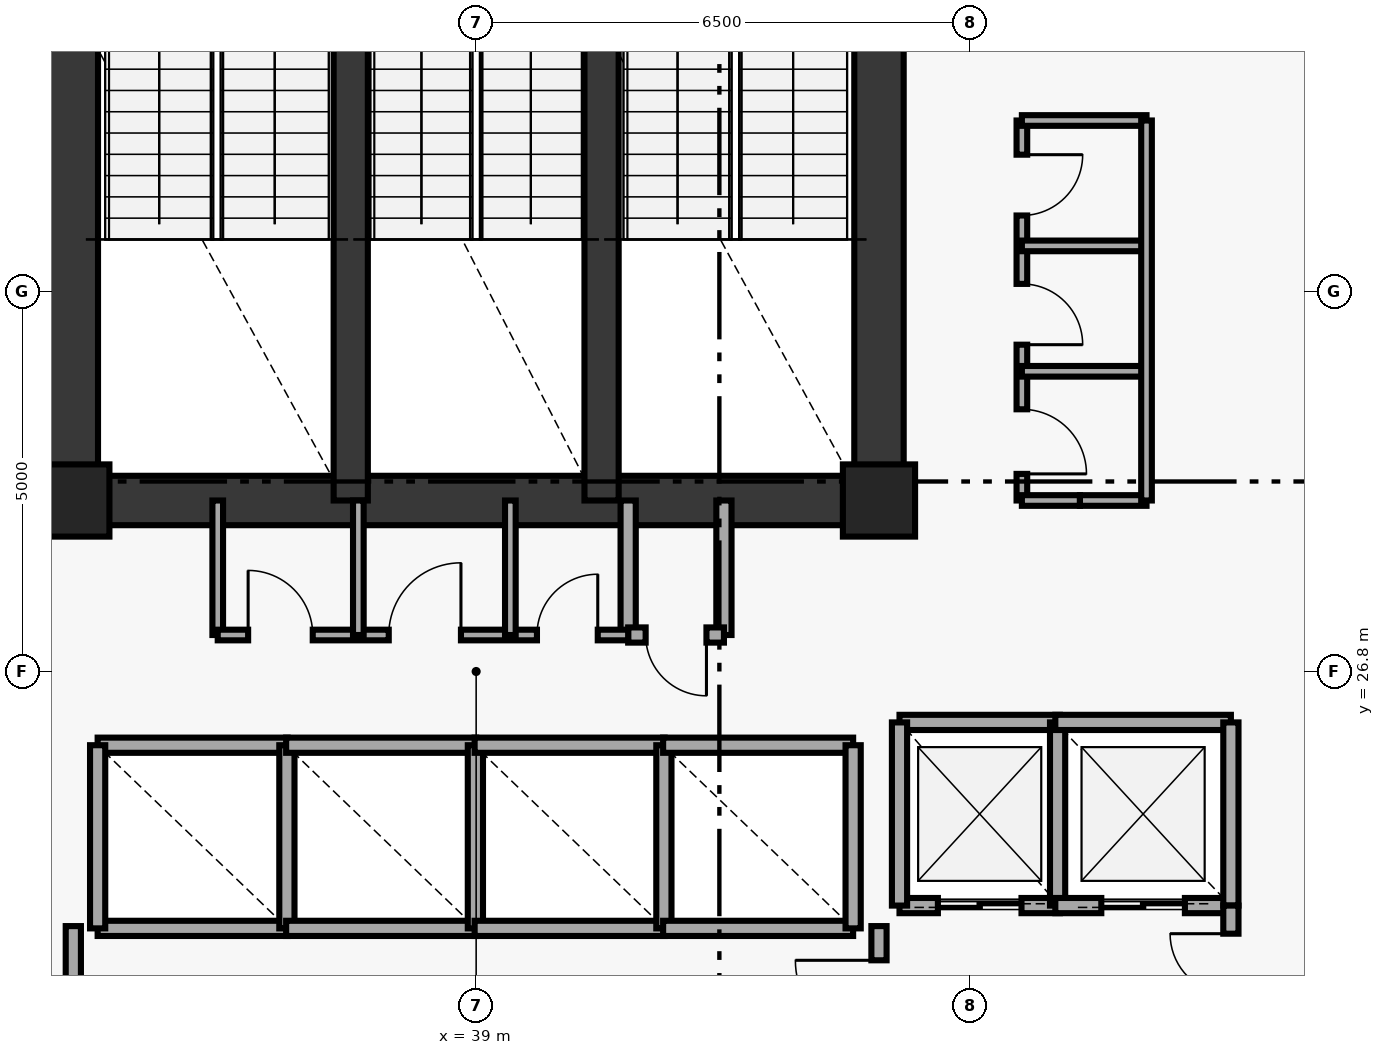
"""IFC4 building model, lengths in metres.
Left out: names, types, materials, properties, quantities, classifications, styles, units other than length and angle.
Written with IfcOpenShell. Run it as: python <this file> out.ifc"""

import sys

from ifc_helpers import new_model, si_unit, direction, frame, frame_2d, origin, origin_2d, place, context, subcontext, project, spatial, rectangle, extrude, element, fill, save


model = new_model("IFC4")
c1 = context("Model", 3, precision=1e-05, world=origin(), true_north=direction((0.0, 1.0)))
c2 = subcontext(c1, "Body", "Model", "MODEL_VIEW")
j1 = project(units=[si_unit("LENGTHUNIT", "METRE"), si_unit("PLANEANGLEUNIT", "RADIAN")], contexts=[c1])
p1 = place(None, origin())
s1 = spatial("IfcSite", under=j1, at=p1, CompositionType="ELEMENT")
p2 = place(p1, origin())
s2 = spatial("IfcBuilding", under=s1, at=p2, CompositionType="ELEMENT")
p3 = place(p2, frame((0.0, 0.0, 195.95)))
s3 = spatial("IfcBuildingStorey", under=s2, at=p3, CompositionType="ELEMENT", Elevation=195.95)
for number, where, z_axis, x_axis in (
    (1, (44.3, 29.05, 0.0), (0.0, 0.0, 1.0), (1.0, 0.0, 0.0)),
    (2, (33.7, 29.05, 0.0), (0.0, 0.0, 1.0), (1.0, 0.0, 0.0)),
):
    element("IfcColumn", number, at=place(p3, frame(where, z_axis=z_axis, x_axis=x_axis)), inside=s3, PredefinedType="PILASTER", context=c2, shape_type="SweptSolid", body=[
        extrude(rectangle(XDim=0.95, YDim=0.95, at=origin_2d()), origin(), (0.0, 0.0, 1.0), 6.88),
    ])
for number, where, z_axis, x_axis in (
    (3, (33.7, 29.05, 0.0), (0.0, 0.0, 1.0), (0.0, 1.0, 0.0)),
    (4, (44.3, 29.05, 0.0), (0.0, 0.0, 1.0), (0.0, 1.0, 0.0)),
):
    element("IfcWall", number, at=place(p3, frame(where, z_axis=z_axis, x_axis=x_axis)), inside=s3, PredefinedType="SHEAR", context=c2, shape_type="SweptSolid", body=[
        extrude(rectangle(XDim=8.35, YDim=0.65, at=frame_2d((4.175, 0.0))), origin(), (0.0, 0.0, 1.0), 6.88),
    ])
p4 = place(p3, frame((33.7, 29.05, 0.0), z_axis=(0.0, 0.0, 1.0), x_axis=(1.0, 0.0, 0.0)))
e5 = element("IfcWall", 5, at=p4, inside=s3, PredefinedType="SHEAR", context=c2, shape_type="SweptSolid", body=[
    extrude(rectangle(XDim=10.6, YDim=0.65, at=frame_2d((5.3, 0.0))), origin(), (0.0, 0.0, 1.0), 6.88),
])
for number, where, z_axis, x_axis in (
    (6, (37.35, 29.05, 0.0), (0.0, 0.0, 1.0), (0.0, 1.0, 0.0)),
    (7, (40.65, 29.05, 0.0), (0.0, 0.0, 1.0), (0.0, 1.0, 0.0)),
):
    element("IfcWall", number, at=place(p3, frame(where, z_axis=z_axis, x_axis=x_axis)), inside=s3, PredefinedType="SHEAR", context=c2, shape_type="SweptSolid", body=[
        extrude(rectangle(XDim=8.35, YDim=0.45, at=frame_2d((4.175, 0.0))), origin(), (0.0, 0.0, 1.0), 6.88),
    ])
p5 = place(p3, frame((35.6, 27.28, 0.0), z_axis=(0.0, 0.0, 1.0), x_axis=(0.0, 1.0, 0.0)))
e8 = element("IfcWall", 8, at=p5, inside=s3, PredefinedType="PARTITIONING", context=c2, shape_type="SweptSolid", body=[
    extrude(rectangle(XDim=1.77, YDim=0.14, at=frame_2d((0.885, 0.0))), origin(), (0.0, 0.0, 1.0), 6.88),
])
for number, where, z_axis, x_axis in (
    (9, (41.0, 27.28, 0.0), (0.0, 0.0, 1.0), (0.0, 1.0, 0.0)),
    (10, (42.26, 27.28, 0.0), (0.0, 0.0, 1.0), (0.0, 1.0, 0.0)),
):
    element("IfcWall", number, at=place(p3, frame(where, z_axis=z_axis, x_axis=x_axis)), inside=s3, PredefinedType="SOLIDWALL", context=c2, shape_type="SweptSolid", body=[
        extrude(rectangle(XDim=1.77, YDim=0.2, at=frame_2d((0.885, 0.0))), origin(), (0.0, 0.0, 1.0), 6.88),
    ])
p6 = place(p3, frame((41.0, 27.28, 0.0), z_axis=(0.0, 0.0, 1.0), x_axis=(1.0, 0.0, 0.0)))
e11 = element("IfcWall", 11, at=p6, inside=s3, PredefinedType="SOLIDWALL", context=c2, shape_type="SweptSolid", body=[
    extrude(rectangle(XDim=1.26, YDim=0.2, at=frame_2d((0.63, 0.0))), origin(), (0.0, 0.0, 1.0), 6.88),
])
p7 = place(p6, frame((0.23, 0.0, 0.0)))
e12 = element("IfcOpeningElement", 12, at=p7, cuts=e11, PredefinedType="OPENING", context=c2, shape_type="SweptSolid", body=[
    extrude(rectangle(XDim=0.8, YDim=2.05, at=frame_2d((0.4, 1.025))), frame((0.0, 0.11, 0.0), z_axis=(0.0, -1.0, 0.0), x_axis=(1.0, 0.0, 0.0)), (0.0, 0.0, 1.0), 0.22),
])
p8 = place(p3, frame((44.57, 23.72, 0.0), z_axis=(0.0, 0.0, 1.0), x_axis=(1.0, 0.0, 0.0)))
e13 = element("IfcWall", 13, at=p8, inside=s3, PredefinedType="SOLIDWALL", context=c2, shape_type="SweptSolid", body=[
    extrude(rectangle(XDim=2.11, YDim=0.2, at=frame_2d((1.055, 0.0))), origin(), (0.0, 0.0, 1.0), 6.88),
])
p9 = place(p8, frame((0.505, 0.0, 0.0)))
e14 = element("IfcOpeningElement", 14, at=p9, cuts=e13, PredefinedType="OPENING", context=c2, shape_type="SweptSolid", body=[
    extrude(rectangle(XDim=1.1, YDim=2.15, at=frame_2d((0.55, 1.075))), frame((0.0, 0.11, 0.0), z_axis=(0.0, -1.0, 0.0), x_axis=(1.0, 0.0, 0.0)), (0.0, 0.0, 1.0), 0.22),
])
p10 = place(p3, frame((44.57, 26.13, 0.0), z_axis=(0.0, 0.0, 1.0), x_axis=(1.0, 0.0, 0.0)))
e15 = element("IfcWall", 15, at=p10, inside=s3, PredefinedType="SOLIDWALL", context=c2, shape_type="SweptSolid", body=[
    extrude(rectangle(XDim=2.11, YDim=0.2, at=frame_2d((1.055, 0.0))), origin(), (0.0, 0.0, 1.0), 6.88),
])
for number, where, z_axis, x_axis in (
    (16, (44.57, 23.72, 0.0), (0.0, 0.0, 1.0), (0.0, 1.0, 0.0)),
    (17, (46.65, 23.72, 0.0), (0.0, 0.0, 1.0), (0.0, 1.0, 0.0)),
):
    element("IfcWall", number, at=place(p3, frame(where, z_axis=z_axis, x_axis=x_axis)), inside=s3, PredefinedType="SOLIDWALL", context=c2, shape_type="SweptSolid", body=[
        extrude(rectangle(XDim=2.41, YDim=0.2, at=frame_2d((1.205, 0.0))), origin(), (0.0, 0.0, 1.0), 6.88),
    ])
p11 = place(p3, frame((46.62, 23.72, 0.0), z_axis=(0.0, 0.0, 1.0), x_axis=(1.0, 0.0, 0.0)))
e18 = element("IfcWall", 18, at=p11, inside=s3, PredefinedType="SOLIDWALL", context=c2, shape_type="SweptSolid", body=[
    extrude(rectangle(XDim=2.31, YDim=0.2, at=frame_2d((1.155, 0.0))), origin(), (0.0, 0.0, 1.0), 6.88),
])
p12 = place(p11, frame((0.605, 0.0, 0.0)))
e19 = element("IfcOpeningElement", 19, at=p12, cuts=e18, PredefinedType="OPENING", context=c2, shape_type="SweptSolid", body=[
    extrude(rectangle(XDim=1.1, YDim=2.15, at=frame_2d((0.55, 1.075))), frame((0.0, 0.11, 0.0), z_axis=(0.0, -1.0, 0.0), x_axis=(1.0, 0.0, 0.0)), (0.0, 0.0, 1.0), 0.22),
])
p13 = place(p3, frame((46.62, 26.13, 0.0), z_axis=(0.0, 0.0, 1.0), x_axis=(1.0, 0.0, 0.0)))
e20 = element("IfcWall", 20, at=p13, inside=s3, PredefinedType="SOLIDWALL", context=c2, shape_type="SweptSolid", body=[
    extrude(rectangle(XDim=2.31, YDim=0.2, at=frame_2d((1.155, 0.0))), origin(), (0.0, 0.0, 1.0), 6.88),
])
p14 = place(p3, frame((48.93, 23.72, 0.0), z_axis=(0.0, 0.0, 1.0), x_axis=(0.0, 1.0, 0.0)))
e21 = element("IfcWall", 21, at=p14, inside=s3, PredefinedType="SOLIDWALL", context=c2, shape_type="SweptSolid", body=[
    extrude(rectangle(XDim=2.41, YDim=0.2, at=frame_2d((1.205, 0.0))), origin(), (0.0, 0.0, 1.0), 6.88),
])
for number, where, z_axis, x_axis in (
    (22, (34.02, 23.42, 0.0), (0.0, 0.0, 1.0), (1.0, 0.0, 0.0)),
    (23, (34.02, 25.83, 0.0), (0.0, 0.0, 1.0), (1.0, 0.0, 0.0)),
):
    element("IfcWall", number, at=place(p3, frame(where, z_axis=z_axis, x_axis=x_axis)), inside=s3, PredefinedType="SOLIDWALL", context=c2, shape_type="SweptSolid", body=[
        extrude(rectangle(XDim=2.5, YDim=0.2, at=frame_2d((1.25, 0.0))), origin(), (0.0, 0.0, 1.0), 6.88),
    ])
for number, where, z_axis, x_axis in (
    (24, (34.02, 23.42, 0.0), (0.0, 0.0, 1.0), (0.0, 1.0, 0.0)),
    (25, (36.51, 23.42, 0.0), (0.0, 0.0, 1.0), (0.0, 1.0, 0.0)),
):
    element("IfcWall", number, at=place(p3, frame(where, z_axis=z_axis, x_axis=x_axis)), inside=s3, PredefinedType="SOLIDWALL", context=c2, shape_type="SweptSolid", body=[
        extrude(rectangle(XDim=2.41, YDim=0.2, at=frame_2d((1.205, 0.0))), origin(), (0.0, 0.0, 1.0), 6.88),
    ])
for number, where, z_axis, x_axis in (
    (26, (36.5, 23.42, 0.0), (0.0, 0.0, 1.0), (1.0, 0.0, 0.0)),
    (27, (36.5, 25.83, 0.0), (0.0, 0.0, 1.0), (1.0, 0.0, 0.0)),
):
    element("IfcWall", number, at=place(p3, frame(where, z_axis=z_axis, x_axis=x_axis)), inside=s3, PredefinedType="SOLIDWALL", context=c2, shape_type="SweptSolid", body=[
        extrude(rectangle(XDim=2.5, YDim=0.2, at=frame_2d((1.25, 0.0))), origin(), (0.0, 0.0, 1.0), 6.88),
    ])
p15 = place(p3, frame((38.99, 23.42, 0.0), z_axis=(0.0, 0.0, 1.0), x_axis=(0.0, 1.0, 0.0)))
e28 = element("IfcWall", 28, at=p15, inside=s3, PredefinedType="SOLIDWALL", context=c2, shape_type="SweptSolid", body=[
    extrude(rectangle(XDim=2.41, YDim=0.2, at=frame_2d((1.205, 0.0))), origin(), (0.0, 0.0, 1.0), 6.88),
])
for number, where, z_axis, x_axis in (
    (29, (38.98, 23.42, 0.0), (0.0, 0.0, 1.0), (1.0, 0.0, 0.0)),
    (30, (38.98, 25.83, 0.0), (0.0, 0.0, 1.0), (1.0, 0.0, 0.0)),
):
    element("IfcWall", number, at=place(p3, frame(where, z_axis=z_axis, x_axis=x_axis)), inside=s3, PredefinedType="SOLIDWALL", context=c2, shape_type="SweptSolid", body=[
        extrude(rectangle(XDim=2.5, YDim=0.2, at=frame_2d((1.25, 0.0))), origin(), (0.0, 0.0, 1.0), 6.88),
    ])
p16 = place(p3, frame((41.47, 23.42, 0.0), z_axis=(0.0, 0.0, 1.0), x_axis=(0.0, 1.0, 0.0)))
e31 = element("IfcWall", 31, at=p16, inside=s3, PredefinedType="SOLIDWALL", context=c2, shape_type="SweptSolid", body=[
    extrude(rectangle(XDim=2.41, YDim=0.2, at=frame_2d((1.205, 0.0))), origin(), (0.0, 0.0, 1.0), 6.88),
])
for number, where, z_axis, x_axis in (
    (32, (41.46, 23.42, 0.0), (0.0, 0.0, 1.0), (1.0, 0.0, 0.0)),
    (33, (41.46, 25.83, 0.0), (0.0, 0.0, 1.0), (1.0, 0.0, 0.0)),
):
    element("IfcWall", number, at=place(p3, frame(where, z_axis=z_axis, x_axis=x_axis)), inside=s3, PredefinedType="SOLIDWALL", context=c2, shape_type="SweptSolid", body=[
        extrude(rectangle(XDim=2.5, YDim=0.2, at=frame_2d((1.25, 0.0))), origin(), (0.0, 0.0, 1.0), 6.88),
    ])
p17 = place(p3, frame((43.96, 23.42, 0.0), z_axis=(0.0, 0.0, 1.0), x_axis=(0.0, 1.0, 0.0)))
e34 = element("IfcWall", 34, at=p17, inside=s3, PredefinedType="SOLIDWALL", context=c2, shape_type="SweptSolid", body=[
    extrude(rectangle(XDim=2.41, YDim=0.2, at=frame_2d((1.205, 0.0))), origin(), (0.0, 0.0, 1.0), 6.88),
])
p18 = place(p3, frame((48.93, 21.38, 0.0), z_axis=(0.0, 0.0, 1.0), x_axis=(0.0, 1.0, 0.0)))
e35 = element("IfcWall", 35, at=p18, inside=s3, PredefinedType="SOLIDWALL", context=c2, shape_type="SweptSolid", body=[
    extrude(rectangle(XDim=2.34, YDim=0.2, at=frame_2d((1.17, 0.0))), origin(), (0.0, 0.0, 1.0), 6.88),
])
p19 = place(p18, frame((0.37, 0.0, 0.0)))
e36 = element("IfcOpeningElement", 36, at=p19, cuts=e35, PredefinedType="OPENING", context=c2, shape_type="SweptSolid", body=[
    extrude(rectangle(XDim=1.6, YDim=2.2, at=frame_2d((0.8, 1.1))), frame((0.0, 0.11, 0.0), z_axis=(0.0, -1.0, 0.0), x_axis=(1.0, 0.0, 0.0)), (0.0, 0.0, 1.0), 0.22),
])
p20 = place(p3, frame((33.7, 21.3, 0.0), z_axis=(0.0, 0.0, 1.0), x_axis=(0.0, 1.0, 0.0)))
e37 = element("IfcWall", 37, at=p20, inside=s3, PredefinedType="SOLIDWALL", context=c2, shape_type="SweptSolid", body=[
    extrude(rectangle(XDim=2.15, YDim=0.2, at=frame_2d((1.075, 0.0))), origin(), (0.0, 0.0, 1.0), 6.265),
])
p21 = place(p3, frame((44.3, 21.35, 0.0), z_axis=(0.0, 0.0, 1.0), x_axis=(0.0, 1.0, 0.0)))
e38 = element("IfcWall", 38, at=p21, inside=s3, PredefinedType="SOLIDWALL", context=c2, shape_type="SweptSolid", body=[
    extrude(rectangle(XDim=2.1, YDim=0.2, at=frame_2d((1.05, 0.0))), origin(), (0.0, 0.0, 1.0), 6.265),
])
p22 = place(p21, frame((0.55, 0.0, 0.0)))
e39 = element("IfcOpeningElement", 39, at=p22, cuts=e38, PredefinedType="OPENING", context=c2, shape_type="SweptSolid", body=[
    extrude(rectangle(XDim=1.1, YDim=2.15, at=frame_2d((0.55, 1.075))), frame((0.0, 0.11, 0.0), z_axis=(0.0, -1.0, 0.0), x_axis=(1.0, 0.0, 0.0)), (0.0, 0.0, 1.0), 0.22),
])
p23 = place(p3, frame((35.6, 27.28, 0.0), z_axis=(0.0, 0.0, 1.0), x_axis=(1.0, 0.0, 0.0)))
e40 = element("IfcWall", 40, at=p23, inside=s3, PredefinedType="PARTITIONING", context=c2, shape_type="SweptSolid", body=[
    extrude(rectangle(XDim=5.4, YDim=0.14, at=frame_2d((2.7, 0.0))), origin(), (0.0, 0.0, 1.0), 6.88),
])
p24 = place(p23, frame((0.4, 0.0, 0.0)))
e41 = element("IfcOpeningElement", 41, at=p24, cuts=e40, PredefinedType="OPENING", context=c2, shape_type="SweptSolid", body=[
    extrude(rectangle(XDim=0.85, YDim=2.1, at=frame_2d((0.425, 1.05))), frame((0.0, 0.08, 0.0), z_axis=(0.0, -1.0, 0.0), x_axis=(1.0, 0.0, 0.0)), (0.0, 0.0, 1.0), 0.16),
])
p25 = place(p23, frame((2.25, 0.0, 0.0)))
e42 = element("IfcOpeningElement", 42, at=p25, cuts=e40, PredefinedType="OPENING", context=c2, shape_type="SweptSolid", body=[
    extrude(rectangle(XDim=0.95, YDim=2.1, at=frame_2d((0.475, 1.05))), frame((0.0, 0.08, 0.0), z_axis=(0.0, -1.0, 0.0), x_axis=(1.0, 0.0, 0.0)), (0.0, 0.0, 1.0), 0.16),
])
p26 = place(p23, frame((4.2, 0.0, 0.0)))
e43 = element("IfcOpeningElement", 43, at=p26, cuts=e40, PredefinedType="OPENING", context=c2, shape_type="SweptSolid", body=[
    extrude(rectangle(XDim=0.8, YDim=2.05, at=frame_2d((0.4, 1.025))), frame((0.0, 0.08, 0.0), z_axis=(0.0, -1.0, 0.0), x_axis=(1.0, 0.0, 0.0)), (0.0, 0.0, 1.0), 0.16),
])
for number, where, z_axis, x_axis in (
    (44, (37.45, 27.28, 0.0), (0.0, 0.0, 1.0), (0.0, 1.0, 0.0)),
    (45, (39.45, 27.28, 0.0), (0.0, 0.0, 1.0), (0.0, 1.0, 0.0)),
):
    element("IfcWall", number, at=place(p3, frame(where, z_axis=z_axis, x_axis=x_axis)), inside=s3, PredefinedType="PARTITIONING", context=c2, shape_type="SweptSolid", body=[
        extrude(rectangle(XDim=1.77, YDim=0.14, at=frame_2d((0.885, 0.0))), origin(), (0.0, 0.0, 1.0), 6.88),
    ])
p27 = place(p3, frame((46.18, 34.05, 0.0), z_axis=(0.0, 0.0, 1.0), x_axis=(0.0, -1.0, 0.0)))
e46 = element("IfcWall", 46, at=p27, inside=s3, PredefinedType="PARTITIONING", context=c2, shape_type="SweptSolid", body=[
    extrude(rectangle(XDim=5.0, YDim=0.14, at=frame_2d((2.5, 0.0))), origin(), (0.0, 0.0, 1.0), 6.88),
])
p28 = place(p27, frame((3.8, 0.0, 0.0)))
e47 = element("IfcOpeningElement", 47, at=p28, cuts=e46, PredefinedType="OPENING", context=c2, shape_type="SweptSolid", body=[
    extrude(rectangle(XDim=0.85, YDim=2.1, at=frame_2d((0.425, 1.05))), frame((0.0, 0.08, 0.0), z_axis=(0.0, -1.0, 0.0), x_axis=(1.0, 0.0, 0.0)), (0.0, 0.0, 1.0), 0.16),
])
p29 = place(p27, frame((2.15, 0.0, 0.0)))
e48 = element("IfcOpeningElement", 48, at=p29, cuts=e46, PredefinedType="OPENING", context=c2, shape_type="SweptSolid", body=[
    extrude(rectangle(XDim=0.8, YDim=2.05, at=frame_2d((0.4, 1.025))), frame((0.0, 0.08, 0.0), z_axis=(0.0, -1.0, 0.0), x_axis=(1.0, 0.0, 0.0)), (0.0, 0.0, 1.0), 0.16),
])
p30 = place(p27, frame((0.45, 0.0, 0.0)))
e49 = element("IfcOpeningElement", 49, at=p30, cuts=e46, PredefinedType="OPENING", context=c2, shape_type="SweptSolid", body=[
    extrude(rectangle(XDim=0.8, YDim=2.05, at=frame_2d((0.4, 1.025))), frame((0.0, 0.08, 0.0), z_axis=(0.0, -1.0, 0.0), x_axis=(1.0, 0.0, 0.0)), (0.0, 0.0, 1.0), 0.16),
])
p31 = place(p3, frame((46.18, 29.05, 0.0), z_axis=(0.0, 0.0, 1.0), x_axis=(1.0, 0.0, 0.0)))
e50 = element("IfcWall", 50, at=p31, inside=s3, PredefinedType="PARTITIONING", context=c2, shape_type="SweptSolid", body=[
    extrude(rectangle(XDim=0.764, YDim=0.14, at=frame_2d((0.382, 0.0))), origin(), (0.0, 0.0, 1.0), 4.88),
])
p32 = place(p3, frame((46.944, 29.05, 0.0), z_axis=(0.0, 0.0, 1.0), x_axis=(1.0, 0.0, 0.0)))
e51 = element("IfcWall", 51, at=p32, inside=s3, PredefinedType="PARTITIONING", context=c2, shape_type="SweptSolid", body=[
    extrude(rectangle(XDim=0.876, YDim=0.14, at=frame_2d((0.438, 0.0))), origin(), (0.0, 0.0, 1.0), 6.88),
])
for number, where, z_axis, x_axis in (
    (52, (46.18, 30.75, 0.0), (0.0, 0.0, 1.0), (1.0, 0.0, 0.0)),
    (53, (46.18, 32.4, 0.0), (0.0, 0.0, 1.0), (1.0, 0.0, 0.0)),
    (54, (46.18, 34.05, 0.0), (0.0, 0.0, 1.0), (1.0, 0.0, 0.0)),
):
    element("IfcWall", number, at=place(p3, frame(where, z_axis=z_axis, x_axis=x_axis)), inside=s3, PredefinedType="PARTITIONING", context=c2, shape_type="SweptSolid", body=[
        extrude(rectangle(XDim=1.64, YDim=0.14, at=frame_2d((0.82, 0.0))), origin(), (0.0, 0.0, 1.0), 6.88),
    ])
p33 = place(p3, frame((47.82, 29.05, 0.0), z_axis=(0.0, 0.0, 1.0), x_axis=(0.0, 1.0, 0.0)))
e55 = element("IfcWall", 55, at=p33, inside=s3, PredefinedType="PARTITIONING", context=c2, shape_type="SweptSolid", body=[
    extrude(rectangle(XDim=5.0, YDim=0.14, at=frame_2d((2.5, 0.0))), origin(), (0.0, 0.0, 1.0), 6.88),
])
p34 = place(p7, origin())
e56 = element("IfcDoor", 56, at=p34, inside=s3, OperationType="SINGLE_SWING_RIGHT", PredefinedType="DOOR", context=c2, shape_type="SweptSolid", body=[
    extrude(rectangle(XDim=0.8, YDim=2.05, at=frame_2d((0.4, 1.025))), frame((0.0, 0.025, 0.0), z_axis=(0.0, -1.0, 0.0), x_axis=(1.0, 0.0, 0.0)), (0.0, 0.0, 1.0), 0.05),
])
fill(e12, e56)
p35 = place(p9, origin())
e57 = element("IfcDoor", 57, at=p35, inside=s3, OperationType="DOUBLE_DOOR_SLIDING", PredefinedType="DOOR", context=c2, shape_type="SweptSolid", body=[
    extrude(rectangle(XDim=1.1, YDim=2.15, at=frame_2d((0.55, 1.075))), frame((0.0, 0.025, 0.0), z_axis=(0.0, -1.0, 0.0), x_axis=(1.0, 0.0, 0.0)), (0.0, 0.0, 1.0), 0.05),
])
fill(e14, e57)
p36 = place(p12, origin())
e58 = element("IfcDoor", 58, at=p36, inside=s3, OperationType="DOUBLE_DOOR_SLIDING", PredefinedType="DOOR", context=c2, shape_type="SweptSolid", body=[
    extrude(rectangle(XDim=1.1, YDim=2.15, at=frame_2d((0.55, 1.075))), frame((0.0, 0.025, 0.0), z_axis=(0.0, -1.0, 0.0), x_axis=(1.0, 0.0, 0.0)), (0.0, 0.0, 1.0), 0.05),
])
fill(e19, e58)
p37 = place(p19, origin())
e59 = element("IfcDoor", 59, at=p37, inside=s3, OperationType="DOUBLE_DOOR_SINGLE_SWING", PredefinedType="DOOR", context=c2, shape_type="SweptSolid", body=[
    extrude(rectangle(XDim=1.6, YDim=2.2, at=frame_2d((0.8, 1.1))), frame((0.0, 0.025, 0.0), z_axis=(0.0, -1.0, 0.0), x_axis=(1.0, 0.0, 0.0)), (0.0, 0.0, 1.0), 0.05),
])
fill(e36, e59)
p38 = place(p22, origin())
e60 = element("IfcDoor", 60, at=p38, inside=s3, OperationType="SINGLE_SWING_RIGHT", PredefinedType="DOOR", context=c2, shape_type="SweptSolid", body=[
    extrude(rectangle(XDim=1.1, YDim=2.15, at=frame_2d((0.55, 1.075))), frame((0.0, 0.025, 0.0), z_axis=(0.0, -1.0, 0.0), x_axis=(1.0, 0.0, 0.0)), (0.0, 0.0, 1.0), 0.05),
])
fill(e39, e60)
p39 = place(p24, origin())
e61 = element("IfcDoor", 61, at=p39, inside=s3, OperationType="SINGLE_SWING_LEFT", PredefinedType="DOOR", context=c2, shape_type="SweptSolid", body=[
    extrude(rectangle(XDim=0.85, YDim=2.1, at=frame_2d((0.425, 1.05))), frame((0.0, 0.025, 0.0), z_axis=(0.0, -1.0, 0.0), x_axis=(1.0, 0.0, 0.0)), (0.0, 0.0, 1.0), 0.05),
])
fill(e41, e61)
p40 = place(p25, origin())
e62 = element("IfcDoor", 62, at=p40, inside=s3, OperationType="SINGLE_SWING_RIGHT", PredefinedType="DOOR", context=c2, shape_type="SweptSolid", body=[
    extrude(rectangle(XDim=0.95, YDim=2.1, at=frame_2d((0.475, 1.05))), frame((0.0, 0.025, 0.0), z_axis=(0.0, -1.0, 0.0), x_axis=(1.0, 0.0, 0.0)), (0.0, 0.0, 1.0), 0.05),
])
fill(e42, e62)
p41 = place(p26, origin())
e63 = element("IfcDoor", 63, at=p41, inside=s3, OperationType="SINGLE_SWING_RIGHT", PredefinedType="DOOR", context=c2, shape_type="SweptSolid", body=[
    extrude(rectangle(XDim=0.8, YDim=2.05, at=frame_2d((0.4, 1.025))), frame((0.0, 0.025, 0.0), z_axis=(0.0, -1.0, 0.0), x_axis=(1.0, 0.0, 0.0)), (0.0, 0.0, 1.0), 0.05),
])
fill(e43, e63)
p42 = place(p28, origin())
e64 = element("IfcDoor", 64, at=p42, inside=s3, OperationType="SINGLE_SWING_RIGHT", PredefinedType="DOOR", context=c2, shape_type="SweptSolid", body=[
    extrude(rectangle(XDim=0.85, YDim=2.1, at=frame_2d((0.425, 1.05))), frame((0.0, 0.025, 0.0), z_axis=(0.0, -1.0, 0.0), x_axis=(1.0, 0.0, 0.0)), (0.0, 0.0, 1.0), 0.05),
])
fill(e47, e64)
p43 = place(p29, origin())
e65 = element("IfcDoor", 65, at=p43, inside=s3, OperationType="SINGLE_SWING_RIGHT", PredefinedType="DOOR", context=c2, shape_type="SweptSolid", body=[
    extrude(rectangle(XDim=0.8, YDim=2.05, at=frame_2d((0.4, 1.025))), frame((0.0, 0.025, 0.0), z_axis=(0.0, -1.0, 0.0), x_axis=(1.0, 0.0, 0.0)), (0.0, 0.0, 1.0), 0.05),
])
fill(e48, e65)
p44 = place(p30, origin())
e66 = element("IfcDoor", 66, at=p44, inside=s3, OperationType="SINGLE_SWING_LEFT", PredefinedType="DOOR", context=c2, shape_type="SweptSolid", body=[
    extrude(rectangle(XDim=0.8, YDim=2.05, at=frame_2d((0.4, 1.025))), frame((0.0, 0.025, 0.0), z_axis=(0.0, -1.0, 0.0), x_axis=(1.0, 0.0, 0.0)), (0.0, 0.0, 1.0), 0.05),
])
fill(e49, e66)
save(model, sys.argv[1])
